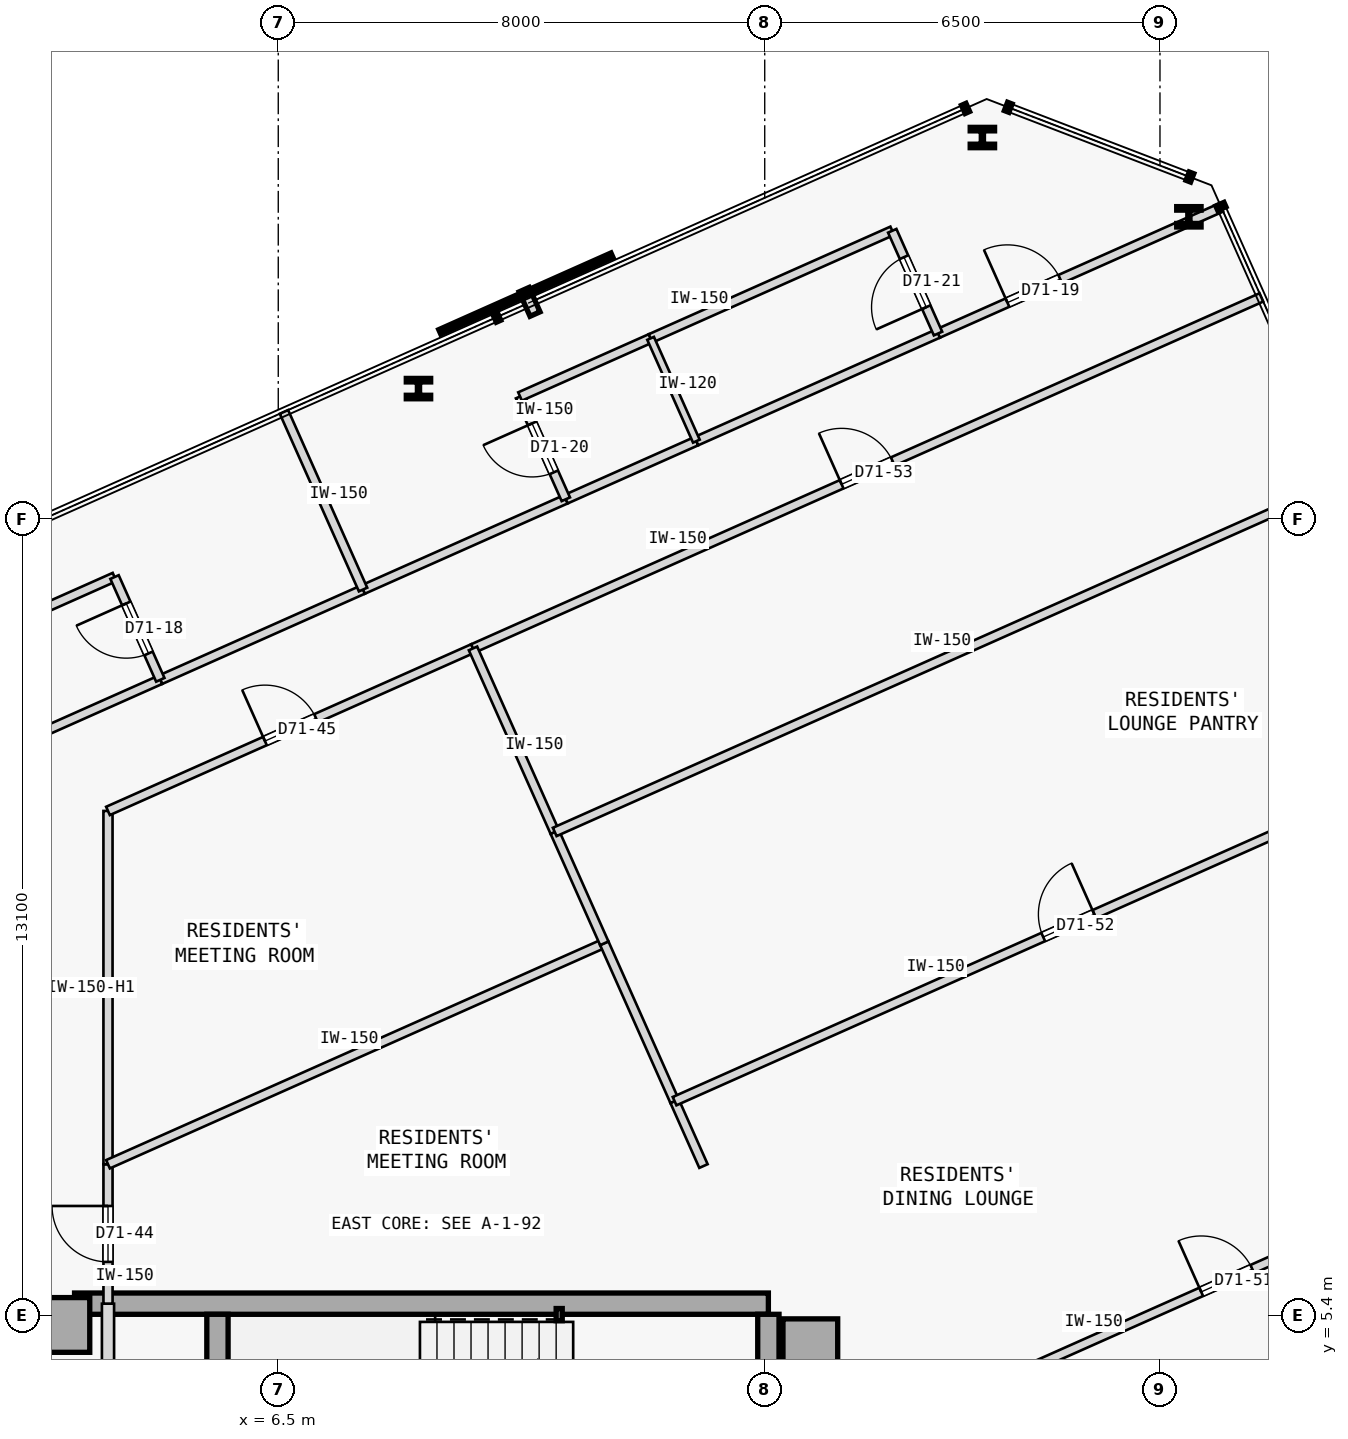
"""IFC4 building model, lengths in metres.
Left out: names, types, materials, properties, quantities, classifications, styles, units other than length and angle.
Written with IfcOpenShell. Run it as: python <this file> out.ifc"""

import sys

from ifc_helpers import new_model, si_unit, direction, frame, frame_2d, origin, origin_2d, place, context, subcontext, project, spatial, rectangle, hollow_rectangle, i_section, extrude, element, fill, save


model = new_model("IFC4")
c1 = context("Model", 3, precision=1e-05, world=origin(), true_north=direction((0.0, 1.0)))
c2 = subcontext(c1, "Body", "Model", "MODEL_VIEW")
j1 = project(units=[si_unit("LENGTHUNIT", "METRE"), si_unit("PLANEANGLEUNIT", "RADIAN")], contexts=[c1])
p1 = place(None, origin())
s1 = spatial("IfcSite", under=j1, at=p1, CompositionType="ELEMENT")
p2 = place(p1, origin())
s2 = spatial("IfcBuilding", under=s1, at=p2, CompositionType="ELEMENT")
p3 = place(p2, frame((0.0, 0.0, 265.55)))
s3 = spatial("IfcBuildingStorey", under=s2, at=p3, CompositionType="ELEMENT", Elevation=265.55)
for number, where, z_axis, x_axis in (
    (1, (15.25, 4.9, 0.0), (0.0, 0.0, 1.0), (1.0, 0.0, 0.0)),
    (2, (2.95, 5.25, 0.0), (0.0, 0.0, 1.0), (1.0, 0.0, 0.0)),
):
    element("IfcColumn", number, at=place(p3, frame(where, z_axis=z_axis, x_axis=x_axis)), inside=s3, PredefinedType="COLUMN", context=c2, shape_type="SweptSolid", body=[
        extrude(rectangle(XDim=0.9, YDim=0.9, at=origin_2d()), origin(), (0.0, 0.0, 1.0), 3.35),
    ])
p4 = place(p3, frame((3.15, 5.6, 0.0), z_axis=(0.0, 0.0, 1.0), x_axis=(1.0, 0.0, 0.0)))
e3 = element("IfcWall", 3, at=p4, inside=s3, PredefinedType="SHEAR", context=c2, shape_type="SweptSolid", body=[
    extrude(rectangle(XDim=11.41, YDim=0.35, at=frame_2d((5.705, 0.0))), origin(), (0.0, 0.0, 1.0), 3.125),
])
p5 = place(p3, frame((14.56, -5.425, 0.0), z_axis=(0.0, 0.0, 1.0), x_axis=(0.0, 1.0, 0.0)))
e4 = element("IfcWall", 4, at=p5, inside=s3, PredefinedType="SHEAR", context=c2, shape_type="SweptSolid", body=[
    extrude(rectangle(XDim=10.85, YDim=0.35, at=frame_2d((5.425, 0.0))), origin(), (0.0, 0.0, 1.0), 3.125),
])
p6 = place(p3, frame((5.5, 2.15, 0.0), z_axis=(0.0, 0.0, 1.0), x_axis=(0.0, 1.0, 0.0)))
e5 = element("IfcWall", 5, at=p6, inside=s3, PredefinedType="SHEAR", context=c2, shape_type="SweptSolid", body=[
    extrude(rectangle(XDim=3.275, YDim=0.35, at=frame_2d((1.638, 0.0))), origin(), (0.0, 0.0, 1.0), 3.125),
])
p7 = place(p3, frame((11.12, 5.42, 0.0), z_axis=(0.0, 0.0, 1.0), x_axis=(1.0, 0.0, 0.0)))
e6 = element("IfcColumn", 6, at=p7, inside=s3, PredefinedType="COLUMN", context=c2, shape_type="SweptSolid", body=[
    extrude(hollow_rectangle(XDim=0.1, YDim=0.2, WallThickness=0.008, at=origin_2d()), origin(), (0.0, 0.0, 1.0), 3.35),
])
for number, where, z_axis, x_axis in (
    (7, (21.476, 23.473, 0.0), (0.0, 0.0, 1.0), (1.0, 0.0, 0.0)),
    (8, (18.08, 24.777, 0.0), (0.0, 0.0, 1.0), (1.0, 0.0, 0.0)),
    (9, (8.806, 20.648, 0.0), (0.0, 0.0, 1.0), (1.0, 0.0, 0.0)),
):
    element("IfcColumn", number, at=place(p3, frame(where, z_axis=z_axis, x_axis=x_axis)), inside=s3, PredefinedType="COLUMN", context=c2, shape_type="SweptSolid", body=[
        extrude(i_section(OverallWidth=0.401, OverallDepth=0.335, WebThickness=0.036, FlangeThickness=0.058, FilletRadius=0.015, at=origin_2d()), origin(), (0.0, 0.0, 1.0), 3.35),
    ])
p8 = place(p3, frame((3.7, -1.15, 0.0), z_axis=(0.0, 0.0, 1.0), x_axis=(0.0, 1.0, 0.0)))
e10 = element("IfcWall", 10, at=p8, inside=s3, PredefinedType="STANDARD", context=c2, shape_type="SweptSolid", body=[
    extrude(rectangle(XDim=6.75, YDim=0.2, at=frame_2d((3.375, 0.0))), origin(), (0.0, 0.0, 1.0), 3.125),
])
p9 = place(p8, frame((0.35, 0.0, 0.0)))
e11 = element("IfcOpeningElement", 11, at=p9, cuts=e10, PredefinedType="OPENING", context=c2, shape_type="SweptSolid", body=[
    extrude(rectangle(XDim=0.88, YDim=2.15, at=frame_2d((0.44, 1.075))), frame((0.0, 0.11, 0.0), z_axis=(0.0, -1.0, 0.0), x_axis=(1.0, 0.0, 0.0)), (0.0, 0.0, 1.0), 0.22),
])
p10 = place(p8, frame((2.55, 0.0, 0.0)))
e12 = element("IfcOpeningElement", 12, at=p10, cuts=e10, PredefinedType="OPENING", context=c2, shape_type="SweptSolid", body=[
    extrude(rectangle(XDim=0.92, YDim=2.15, at=frame_2d((0.46, 1.075))), frame((0.0, 0.11, 0.0), z_axis=(0.0, -1.0, 0.0), x_axis=(1.0, 0.0, 0.0)), (0.0, 0.0, 1.0), 0.22),
])
p11 = place(p8, frame((4.22, 0.0, 0.0)))
e13 = element("IfcOpeningElement", 13, at=p11, cuts=e10, PredefinedType="OPENING", context=c2, shape_type="SweptSolid", body=[
    extrude(rectangle(XDim=0.88, YDim=2.15, at=frame_2d((0.44, 1.075))), frame((0.0, 0.11, 0.0), z_axis=(0.0, -1.0, 0.0), x_axis=(1.0, 0.0, 0.0)), (0.0, 0.0, 1.0), 0.22),
])
p12 = place(p3, frame((4.56, 15.859, 0.0), z_axis=(0.0, 0.0, 1.0), x_axis=(0.913543802, 0.40674036169, 0.0)))
e14 = element("IfcWall", 14, at=p12, inside=s3, PredefinedType="PARTITIONING", context=c2, shape_type="SweptSolid", body=[
    extrude(rectangle(XDim=3.65, YDim=0.15, at=frame_2d((1.825, 0.0))), origin(), (0.0, 0.0, 1.0), 3.125),
])
p13 = place(p3, frame((0.977, 14.264, 0.0), z_axis=(0.0, 0.0, 1.0), x_axis=(0.913549532696, 0.406727490232, 0.0)))
e15 = element("IfcWall", 15, at=p13, inside=s3, PredefinedType="PARTITIONING", context=c2, shape_type="SweptSolid", body=[
    extrude(rectangle(XDim=3.922, YDim=0.15, at=frame_2d((1.961, 0.0))), origin(), (0.0, 0.0, 1.0), 3.125),
])
p14 = place(p3, frame((7.895, 17.344, 0.0), z_axis=(0.0, 0.0, 1.0), x_axis=(0.913543802, 0.40674036169, 0.0)))
e16 = element("IfcWall", 16, at=p14, inside=s3, PredefinedType="PARTITIONING", context=c2, shape_type="SweptSolid", body=[
    extrude(rectangle(XDim=3.65, YDim=0.15, at=frame_2d((1.825, 0.0))), origin(), (0.0, 0.0, 1.0), 3.125),
])
p15 = place(p3, frame((17.35, 21.553, 0.0), z_axis=(0.0, 0.0, 1.0), x_axis=(0.913558695023, 0.40670691013, 0.0)))
e17 = element("IfcWall", 17, at=p15, inside=s3, PredefinedType="PARTITIONING", context=c2, shape_type="SweptSolid", body=[
    extrude(rectangle(XDim=5.1, YDim=0.15, at=frame_2d((2.55, 0.0))), origin(), (0.0, 0.0, 1.0), 3.125),
])
p16 = place(p15, frame((1.25, 0.0, 0.0)))
e18 = element("IfcOpeningElement", 18, at=p16, cuts=e17, PredefinedType="OPENING", context=c2, shape_type="SweptSolid", body=[
    extrude(rectangle(XDim=0.95, YDim=2.15, at=frame_2d((0.475, 1.075))), frame((0.0, 0.085, 0.0), z_axis=(0.0, -1.0, 0.0), x_axis=(1.0, 0.0, 0.0)), (0.0, 0.0, 1.0), 0.17),
])
p17 = place(p3, frame((11.229, 18.828, 0.0), z_axis=(0.0, 0.0, 1.0), x_axis=(0.913541436194, 0.406745675276, 0.0)))
e19 = element("IfcWall", 19, at=p17, inside=s3, PredefinedType="PARTITIONING", context=c2, shape_type="SweptSolid", body=[
    extrude(rectangle(XDim=2.35, YDim=0.15, at=frame_2d((1.175, 0.0))), origin(), (0.0, 0.0, 1.0), 3.125),
])
p18 = place(p3, frame((13.376, 19.784, 0.0), z_axis=(0.0, 0.0, 1.0), x_axis=(0.913545193015, 0.406737237438, 0.0)))
e20 = element("IfcWall", 20, at=p18, inside=s3, PredefinedType="PARTITIONING", context=c2, shape_type="SweptSolid", body=[
    extrude(rectangle(XDim=4.35, YDim=0.15, at=frame_2d((2.175, 0.0))), origin(), (0.0, 0.0, 1.0), 3.125),
])
p19 = place(p3, frame((3.7, 5.601, 0.0), z_axis=(0.0, 0.0, 1.0), x_axis=(-0.00010651896, 0.999999994327, 0.0)))
e21 = element("IfcWall", 21, at=p19, inside=s3, PredefinedType="PARTITIONING", context=c2, shape_type="SweptSolid", body=[
    extrude(rectangle(XDim=2.292, YDim=0.15, at=frame_2d((1.146, 0.0))), origin(), (0.0, 0.0, 1.0), 3.125),
])
p20 = place(p19, frame((0.686, 0.0, 0.0)))
e22 = element("IfcOpeningElement", 22, at=p20, cuts=e21, PredefinedType="OPENING", context=c2, shape_type="SweptSolid", body=[
    extrude(rectangle(XDim=0.92, YDim=2.15, at=frame_2d((0.46, 1.075))), frame((0.0, 0.085, 0.0), z_axis=(0.0, -1.0, 0.0), x_axis=(1.0, 0.0, 0.0)), (0.0, 0.0, 1.0), 0.17),
])
p21 = place(p3, frame((3.7, 7.893, 0.0), z_axis=(0.0, 0.0, 1.0), x_axis=(-4.2018572e-05, 0.999999999117, 0.0)))
e23 = element("IfcWall", 23, at=p21, inside=s3, PredefinedType="PARTITIONING", context=c2, shape_type="SweptSolid", body=[
    extrude(rectangle(XDim=5.81, YDim=0.15, at=frame_2d((2.905, 0.0))), origin(), (0.0, 0.0, 1.0), 2.675),
])
p22 = place(p3, frame((3.7, 13.703, 0.0), z_axis=(0.0, 0.0, 1.0), x_axis=(0.913549363376, 0.406727870542, 0.0)))
e24 = element("IfcWall", 24, at=p22, inside=s3, PredefinedType="PARTITIONING", context=c2, shape_type="SweptSolid", body=[
    extrude(rectangle(XDim=6.571, YDim=0.15, at=frame_2d((3.286, 0.0))), origin(), (0.0, 0.0, 1.0), 3.125),
])
p23 = place(p22, frame((2.825, 0.0, 0.0)))
e25 = element("IfcOpeningElement", 25, at=p23, cuts=e24, PredefinedType="OPENING", context=c2, shape_type="SweptSolid", body=[
    extrude(rectangle(XDim=0.92, YDim=2.15, at=frame_2d((0.46, 1.075))), frame((0.0, 0.085, 0.0), z_axis=(0.0, -1.0, 0.0), x_axis=(1.0, 0.0, 0.0)), (0.0, 0.0, 1.0), 0.17),
])
p24 = place(p3, frame((9.703, 16.375, 0.0), z_axis=(0.0, 0.0, 1.0), x_axis=(0.913544622417, 0.406738519018, 0.0)))
e26 = element("IfcWall", 26, at=p24, inside=s3, PredefinedType="PARTITIONING", context=c2, shape_type="SweptSolid", body=[
    extrude(rectangle(XDim=14.192, YDim=0.15, at=frame_2d((7.096, 0.0))), origin(), (0.0, 0.0, 1.0), 3.125),
])
p25 = place(p24, frame((6.636, 0.0, 0.0)))
e27 = element("IfcOpeningElement", 27, at=p25, cuts=e26, PredefinedType="OPENING", context=c2, shape_type="SweptSolid", body=[
    extrude(rectangle(XDim=0.92, YDim=2.15, at=frame_2d((0.46, 1.075))), frame((0.0, 0.085, 0.0), z_axis=(0.0, -1.0, 0.0), x_axis=(1.0, 0.0, 0.0)), (0.0, 0.0, 1.0), 0.17),
])
p26 = place(p3, frame((0.225, 15.954, 0.0), z_axis=(0.0, 0.0, 1.0), x_axis=(0.913549532696, 0.406727490232, 0.0)))
e28 = element("IfcWall", 28, at=p26, inside=s3, PredefinedType="PARTITIONING", context=c2, shape_type="SweptSolid", body=[
    extrude(rectangle(XDim=3.922, YDim=0.15, at=frame_2d((1.961, 0.0))), origin(), (0.0, 0.0, 1.0), 3.125),
])
p27 = place(p3, frame((4.56, 15.859, 0.0), z_axis=(0.0, 0.0, 1.0), x_axis=(-0.406701600856, 0.913561058639, 0.0)))
e29 = element("IfcWall", 29, at=p27, inside=s3, PredefinedType="PARTITIONING", context=c2, shape_type="SweptSolid", body=[
    extrude(rectangle(XDim=1.85, YDim=0.15, at=frame_2d((0.925, 0.0))), origin(), (0.0, 0.0, 1.0), 3.125),
])
p28 = place(p27, frame((0.475, 0.0, 0.0)))
e30 = element("IfcOpeningElement", 30, at=p28, cuts=e29, PredefinedType="OPENING", context=c2, shape_type="SweptSolid", body=[
    extrude(rectangle(XDim=0.9, YDim=2.15, at=frame_2d((0.45, 1.075))), frame((0.0, 0.085, 0.0), z_axis=(0.0, -1.0, 0.0), x_axis=(1.0, 0.0, 0.0)), (0.0, 0.0, 1.0), 0.17),
])
p29 = place(p3, frame((7.895, 17.344, 0.0), z_axis=(0.0, 0.0, 1.0), x_axis=(-0.406733350739, 0.913546923478, 0.0)))
e31 = element("IfcWall", 31, at=p29, inside=s3, PredefinedType="PARTITIONING", context=c2, shape_type="SweptSolid", body=[
    extrude(rectangle(XDim=3.198, YDim=0.15, at=frame_2d((1.599, 0.0))), origin(), (0.0, 0.0, 1.0), 3.125),
])
p30 = place(p3, frame((11.229, 18.828, 0.0), z_axis=(0.0, 0.0, 1.0), x_axis=(-0.406750635596, 0.913539227643, 0.0)))
e32 = element("IfcWall", 32, at=p30, inside=s3, PredefinedType="PARTITIONING", context=c2, shape_type="SweptSolid", body=[
    extrude(rectangle(XDim=1.85, YDim=0.15, at=frame_2d((0.925, 0.0))), origin(), (0.0, 0.0, 1.0), 3.125),
])
p31 = place(p30, frame((0.485, 0.0, 0.0)))
e33 = element("IfcOpeningElement", 33, at=p31, cuts=e32, PredefinedType="OPENING", context=c2, shape_type="SweptSolid", body=[
    extrude(rectangle(XDim=0.88, YDim=2.15, at=frame_2d((0.44, 1.075))), frame((0.0, 0.085, 0.0), z_axis=(0.0, -1.0, 0.0), x_axis=(1.0, 0.0, 0.0)), (0.0, 0.0, 1.0), 0.17),
])
p32 = place(p3, frame((10.477, 20.518, 0.0), z_axis=(0.0, 0.0, 1.0), x_axis=(0.913541436194, 0.406745675276, 0.0)))
e34 = element("IfcWall", 34, at=p32, inside=s3, PredefinedType="PARTITIONING", context=c2, shape_type="SweptSolid", body=[
    extrude(rectangle(XDim=2.35, YDim=0.15, at=frame_2d((1.175, 0.0))), origin(), (0.0, 0.0, 1.0), 3.125),
])
p33 = place(p3, frame((12.623, 21.474, 0.0), z_axis=(0.0, 0.0, 1.0), x_axis=(0.913545193015, 0.406737237438, 0.0)))
e35 = element("IfcWall", 35, at=p33, inside=s3, PredefinedType="PARTITIONING", context=c2, shape_type="SweptSolid", body=[
    extrude(rectangle(XDim=4.35, YDim=0.15, at=frame_2d((2.175, 0.0))), origin(), (0.0, 0.0, 1.0), 3.125),
])
p34 = place(p3, frame((17.35, 21.553, 0.0), z_axis=(0.0, 0.0, 1.0), x_axis=(-0.406750635596, 0.913539227643, 0.0)))
e36 = element("IfcWall", 36, at=p34, inside=s3, PredefinedType="PARTITIONING", context=c2, shape_type="SweptSolid", body=[
    extrude(rectangle(XDim=1.85, YDim=0.15, at=frame_2d((0.925, 0.0))), origin(), (0.0, 0.0, 1.0), 3.125),
])
p35 = place(p34, frame((0.475, 0.0, 0.0)))
e37 = element("IfcOpeningElement", 37, at=p35, cuts=e36, PredefinedType="OPENING", context=c2, shape_type="SweptSolid", body=[
    extrude(rectangle(XDim=0.9, YDim=2.15, at=frame_2d((0.45, 1.075))), frame((0.0, 0.085, 0.0), z_axis=(0.0, -1.0, 0.0), x_axis=(1.0, 0.0, 0.0)), (0.0, 0.0, 1.0), 0.17),
])
p36 = place(p3, frame((13.376, 19.784, 0.0), z_axis=(0.0, 0.0, 1.0), x_axis=(-0.406750635596, 0.913539227643, 0.0)))
e38 = element("IfcWall", 38, at=p36, inside=s3, PredefinedType="PARTITIONING", context=c2, shape_type="SweptSolid", body=[
    extrude(rectangle(XDim=1.85, YDim=0.12, at=frame_2d((0.925, 0.0))), origin(), (0.0, 0.0, 1.0), 3.125),
])
p37 = place(p3, frame((3.7, 7.893, 0.0), z_axis=(0.0, 0.0, 1.0), x_axis=(0.913545406364, 0.406736758251, 0.0)))
e39 = element("IfcWall", 39, at=p37, inside=s3, PredefinedType="PARTITIONING", context=c2, shape_type="SweptSolid", body=[
    extrude(rectangle(XDim=8.934, YDim=0.15, at=frame_2d((4.467, 0.0))), origin(), (0.0, 0.0, 1.0), 3.125),
])
p38 = place(p3, frame((13.493, 7.863, 0.0), z_axis=(0.0, 0.0, 1.0), x_axis=(-0.406720145117, 0.913552802829, 0.0)))
e40 = element("IfcWall", 40, at=p38, inside=s3, PredefinedType="PARTITIONING", context=c2, shape_type="SweptSolid", body=[
    extrude(rectangle(XDim=1.168, YDim=0.15, at=frame_2d((0.584, 0.0))), origin(), (0.0, 0.0, 1.0), 3.125),
])
p39 = place(p3, frame((13.018, 8.93, 0.0), z_axis=(0.0, 0.0, 1.0), x_axis=(-0.406768056625, 0.913531470782, 0.0)))
e41 = element("IfcWall", 41, at=p39, inside=s3, PredefinedType="PARTITIONING", context=c2, shape_type="SweptSolid", body=[
    extrude(rectangle(XDim=2.842, YDim=0.15, at=frame_2d((1.421, 0.0))), origin(), (0.0, 0.0, 1.0), 3.125),
])
p40 = place(p3, frame((11.862, 11.526, 0.0), z_axis=(0.0, 0.0, 1.0), x_axis=(-0.406760035505, 0.913535042303, 0.0)))
e42 = element("IfcWall", 42, at=p40, inside=s3, PredefinedType="PARTITIONING", context=c2, shape_type="SweptSolid", body=[
    extrude(rectangle(XDim=2.004, YDim=0.15, at=frame_2d((1.002, 0.0))), origin(), (0.0, 0.0, 1.0), 3.125),
])
p41 = place(p3, frame((11.046, 13.357, 0.0), z_axis=(0.0, 0.0, 1.0), x_axis=(-0.406714303965, 0.913555403328, 0.0)))
e43 = element("IfcWall", 43, at=p41, inside=s3, PredefinedType="PARTITIONING", context=c2, shape_type="SweptSolid", body=[
    extrude(rectangle(XDim=3.304, YDim=0.15, at=frame_2d((1.652, 0.0))), origin(), (0.0, 0.0, 1.0), 3.125),
])
p42 = place(p3, frame((15.616, 3.094, 0.0), z_axis=(0.0, 0.0, 1.0), x_axis=(0.913551014388, 0.406724162191, 0.0)))
e44 = element("IfcWall", 44, at=p42, inside=s3, PredefinedType="PARTITIONING", context=c2, shape_type="SweptSolid", body=[
    extrude(rectangle(XDim=14.192, YDim=0.15, at=frame_2d((7.096, 0.0))), origin(), (0.0, 0.0, 1.0), 3.125),
])
p43 = place(p42, frame((6.636, 0.0, 0.0)))
e45 = element("IfcOpeningElement", 45, at=p43, cuts=e44, PredefinedType="OPENING", context=c2, shape_type="SweptSolid", body=[
    extrude(rectangle(XDim=0.92, YDim=2.15, at=frame_2d((0.46, 1.075))), frame((0.0, 0.085, 0.0), z_axis=(0.0, -1.0, 0.0), x_axis=(1.0, 0.0, 0.0)), (0.0, 0.0, 1.0), 0.17),
])
p44 = place(p3, frame((13.018, 8.93, 0.0), z_axis=(0.0, 0.0, 1.0), x_axis=(0.913551014388, 0.406724162191, 0.0)))
e46 = element("IfcWall", 46, at=p44, inside=s3, PredefinedType="PARTITIONING", context=c2, shape_type="SweptSolid", body=[
    extrude(rectangle(XDim=14.192, YDim=0.15, at=frame_2d((7.096, 0.0))), origin(), (0.0, 0.0, 1.0), 3.125),
])
p45 = place(p44, frame((6.636, 0.0, 0.0)))
e47 = element("IfcOpeningElement", 47, at=p45, cuts=e46, PredefinedType="OPENING", context=c2, shape_type="SweptSolid", body=[
    extrude(rectangle(XDim=0.92, YDim=2.15, at=frame_2d((0.46, 1.075))), frame((0.0, 0.085, 0.0), z_axis=(0.0, -1.0, 0.0), x_axis=(1.0, 0.0, 0.0)), (0.0, 0.0, 1.0), 0.17),
])
p46 = place(p3, frame((11.046, 13.357, 0.0), z_axis=(0.0, 0.0, 1.0), x_axis=(0.913553860075, 0.406717770379, 0.0)))
e48 = element("IfcWall", 48, at=p46, inside=s3, PredefinedType="PARTITIONING", context=c2, shape_type="SweptSolid", body=[
    extrude(rectangle(XDim=14.192, YDim=0.15, at=frame_2d((7.096, 0.0))), origin(), (0.0, 0.0, 1.0), 3.125),
])
p47 = place(p28, origin())
e49 = element("IfcDoor", 49, at=p47, inside=s3, OperationType="SINGLE_SWING_RIGHT", PredefinedType="DOOR", context=c2, shape_type="SweptSolid", body=[
    extrude(rectangle(XDim=0.9, YDim=2.15, at=frame_2d((0.45, 1.075))), frame((0.0, 0.025, 0.0), z_axis=(0.0, -1.0, 0.0), x_axis=(1.0, 0.0, 0.0)), (0.0, 0.0, 1.0), 0.05),
])
fill(e30, e49)
p48 = place(p16, origin())
e50 = element("IfcDoor", 50, at=p48, inside=s3, OperationType="SINGLE_SWING_LEFT", PredefinedType="DOOR", context=c2, shape_type="SweptSolid", body=[
    extrude(rectangle(XDim=0.95, YDim=2.15, at=frame_2d((0.475, 1.075))), frame((0.0, 0.025, 0.0), z_axis=(0.0, -1.0, 0.0), x_axis=(1.0, 0.0, 0.0)), (0.0, 0.0, 1.0), 0.05),
])
fill(e18, e50)
p49 = place(p31, origin())
e51 = element("IfcDoor", 51, at=p49, inside=s3, OperationType="SINGLE_SWING_RIGHT", PredefinedType="DOOR", context=c2, shape_type="SweptSolid", body=[
    extrude(rectangle(XDim=0.88, YDim=2.15, at=frame_2d((0.44, 1.075))), frame((0.0, 0.025, 0.0), z_axis=(0.0, -1.0, 0.0), x_axis=(1.0, 0.0, 0.0)), (0.0, 0.0, 1.0), 0.05),
])
fill(e33, e51)
p50 = place(p35, origin())
e52 = element("IfcDoor", 52, at=p50, inside=s3, OperationType="SINGLE_SWING_LEFT", PredefinedType="DOOR", context=c2, shape_type="SweptSolid", body=[
    extrude(rectangle(XDim=0.9, YDim=2.15, at=frame_2d((0.45, 1.075))), frame((0.0, 0.025, 0.0), z_axis=(0.0, -1.0, 0.0), x_axis=(1.0, 0.0, 0.0)), (0.0, 0.0, 1.0), 0.05),
])
fill(e37, e52)
p51 = place(p20, origin())
e53 = element("IfcDoor", 53, at=p51, inside=s3, OperationType="SINGLE_SWING_RIGHT", PredefinedType="DOOR", context=c2, shape_type="SweptSolid", body=[
    extrude(rectangle(XDim=0.92, YDim=2.15, at=frame_2d((0.46, 1.075))), frame((0.0, 0.025, 0.0), z_axis=(0.0, -1.0, 0.0), x_axis=(1.0, 0.0, 0.0)), (0.0, 0.0, 1.0), 0.05),
])
fill(e22, e53)
p52 = place(p23, origin())
e54 = element("IfcDoor", 54, at=p52, inside=s3, OperationType="SINGLE_SWING_LEFT", PredefinedType="DOOR", context=c2, shape_type="SweptSolid", body=[
    extrude(rectangle(XDim=0.92, YDim=2.15, at=frame_2d((0.46, 1.075))), frame((0.0, 0.025, 0.0), z_axis=(0.0, -1.0, 0.0), x_axis=(1.0, 0.0, 0.0)), (0.0, 0.0, 1.0), 0.05),
])
fill(e25, e54)
p53 = place(p43, origin())
e55 = element("IfcDoor", 55, at=p53, inside=s3, OperationType="SINGLE_SWING_LEFT", PredefinedType="DOOR", context=c2, shape_type="SweptSolid", body=[
    extrude(rectangle(XDim=0.92, YDim=2.15, at=frame_2d((0.46, 1.075))), frame((0.0, 0.025, 0.0), z_axis=(0.0, -1.0, 0.0), x_axis=(1.0, 0.0, 0.0)), (0.0, 0.0, 1.0), 0.05),
])
fill(e45, e55)
p54 = place(p45, origin())
e56 = element("IfcDoor", 56, at=p54, inside=s3, OperationType="SINGLE_SWING_RIGHT", PredefinedType="DOOR", context=c2, shape_type="SweptSolid", body=[
    extrude(rectangle(XDim=0.92, YDim=2.15, at=frame_2d((0.46, 1.075))), frame((0.0, 0.025, 0.0), z_axis=(0.0, -1.0, 0.0), x_axis=(1.0, 0.0, 0.0)), (0.0, 0.0, 1.0), 0.05),
])
fill(e47, e56)
p55 = place(p25, origin())
e57 = element("IfcDoor", 57, at=p55, inside=s3, OperationType="SINGLE_SWING_LEFT", PredefinedType="DOOR", context=c2, shape_type="SweptSolid", body=[
    extrude(rectangle(XDim=0.92, YDim=2.15, at=frame_2d((0.46, 1.075))), frame((0.0, 0.025, 0.0), z_axis=(0.0, -1.0, 0.0), x_axis=(1.0, 0.0, 0.0)), (0.0, 0.0, 1.0), 0.05),
])
fill(e27, e57)
save(model, sys.argv[1])
